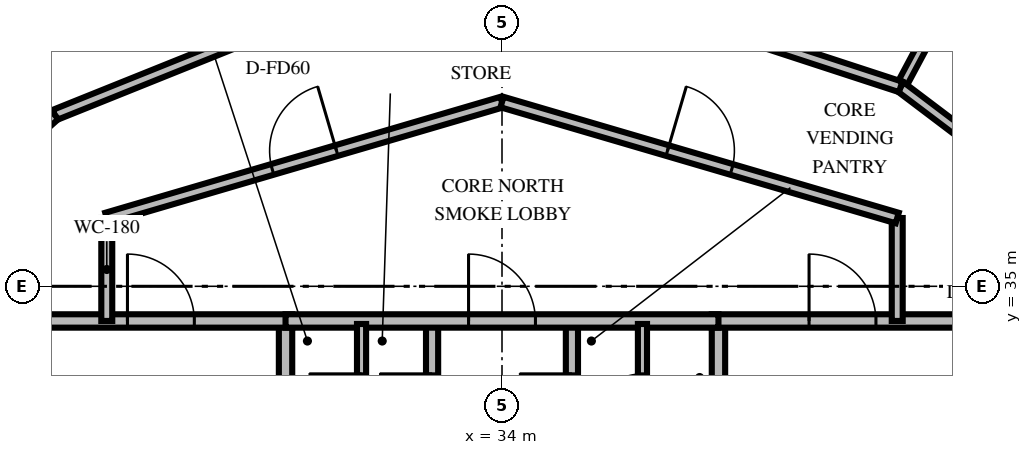
"""IFC4 building model, lengths in metres.
Left out: names, types, materials, properties, quantities, classifications, styles, units other than length and angle.
Written with IfcOpenShell. Run it as: python <this file> out.ifc"""

import sys

from ifc_helpers import new_model, si_unit, direction, frame, frame_2d, origin, place, context, subcontext, project, spatial, rectangle, extrude, element, fill, save


model = new_model("IFC4")
c1 = context("Model", 3, precision=1e-05, world=origin(), true_north=direction((0.0, 1.0)))
c2 = subcontext(c1, "Body", "Model", "MODEL_VIEW")
j1 = project(units=[si_unit("LENGTHUNIT", "METRE"), si_unit("PLANEANGLEUNIT", "RADIAN")], contexts=[c1])
p1 = place(None, origin())
s1 = spatial("IfcSite", under=j1, at=p1, CompositionType="ELEMENT")
p2 = place(p1, origin())
s2 = spatial("IfcBuilding", under=s1, at=p2, CompositionType="ELEMENT")
p3 = place(p2, frame((0.0, 0.0, 38.4)))
s3 = spatial("IfcBuildingStorey", under=s2, at=p3, CompositionType="ELEMENT", Elevation=38.4)
p4 = place(p3, frame((30.44, 30.05, 0.0), z_axis=(0.0, 0.0, 1.0), x_axis=(0.0, 1.0, 0.0)))
e1 = element("IfcWall", 1, at=p4, inside=s3, PredefinedType="SOLIDWALL", context=c2, shape_type="SweptSolid", body=[
    extrude(rectangle(XDim=4.38, YDim=0.22, at=frame_2d((2.19, 0.0))), origin(), (0.0, 0.0, 1.0), 3.0),
])
p5 = place(p4, frame((0.8, 0.0, 0.0)))
e2 = element("IfcOpeningElement", 2, at=p5, cuts=e1, PredefinedType="OPENING", context=c2, shape_type="SweptSolid", body=[
    extrude(rectangle(XDim=1.05, YDim=2.1, at=frame_2d((0.525, 1.05))), frame((0.0, 0.12, 0.0), z_axis=(0.0, -1.0, 0.0), x_axis=(1.0, 0.0, 0.0)), (0.0, 0.0, 1.0), 0.24),
])
p6 = place(p3, frame((26.24, 34.43, 0.0), z_axis=(0.0, 0.0, 1.0), x_axis=(1.0, 0.0, 0.0)))
e3 = element("IfcWall", 3, at=p6, inside=s3, PredefinedType="SOLIDWALL", context=c2, shape_type="SweptSolid", body=[
    extrude(rectangle(XDim=4.31, YDim=0.22, at=frame_2d((2.155, 0.0))), origin(), (0.0, 0.0, 1.0), 3.0),
])
p7 = place(p6, frame((1.6, 0.0, 0.0)))
e4 = element("IfcOpeningElement", 4, at=p7, cuts=e3, PredefinedType="OPENING", context=c2, shape_type="SweptSolid", body=[
    extrude(rectangle(XDim=1.1, YDim=2.15, at=frame_2d((0.55, 1.075))), frame((0.0, 0.12, 0.0), z_axis=(0.0, -1.0, 0.0), x_axis=(1.0, 0.0, 0.0)), (0.0, 0.0, 1.0), 0.24),
])
p8 = place(p3, frame((32.85, 30.05, 0.0), z_axis=(0.0, 0.0, 1.0), x_axis=(0.0, 1.0, 0.0)))
e5 = element("IfcWall", 5, at=p8, inside=s3, PredefinedType="SOLIDWALL", context=c2, shape_type="SweptSolid", body=[
    extrude(rectangle(XDim=4.38, YDim=0.2, at=frame_2d((2.19, 0.0))), origin(), (0.0, 0.0, 1.0), 3.0),
])
p9 = place(p8, frame((2.65, 0.0, 0.0)))
e6 = element("IfcOpeningElement", 6, at=p9, cuts=e5, PredefinedType="OPENING", context=c2, shape_type="SweptSolid", body=[
    extrude(rectangle(XDim=0.86, YDim=2.05, at=frame_2d((0.43, 1.025))), frame((0.0, 0.11, 0.0), z_axis=(0.0, -1.0, 0.0), x_axis=(1.0, 0.0, 0.0)), (0.0, 0.0, 1.0), 0.22),
])
p10 = place(p3, frame((37.56, 30.05, 0.0), z_axis=(0.0, 0.0, 1.0), x_axis=(0.0, 1.0, 0.0)))
e7 = element("IfcWall", 7, at=p10, inside=s3, PredefinedType="SOLIDWALL", context=c2, shape_type="SweptSolid", body=[
    extrude(rectangle(XDim=4.38, YDim=0.22, at=frame_2d((2.19, 0.0))), origin(), (0.0, 0.0, 1.0), 3.0),
])
p11 = place(p10, frame((0.8, 0.0, 0.0)))
e8 = element("IfcOpeningElement", 8, at=p11, cuts=e7, PredefinedType="OPENING", context=c2, shape_type="SweptSolid", body=[
    extrude(rectangle(XDim=1.05, YDim=2.1, at=frame_2d((0.525, 1.05))), frame((0.0, 0.12, 0.0), z_axis=(0.0, -1.0, 0.0), x_axis=(1.0, 0.0, 0.0)), (0.0, 0.0, 1.0), 0.24),
])
p12 = place(p3, frame((37.45, 34.43, 0.0), z_axis=(0.0, 0.0, 1.0), x_axis=(1.0, 0.0, 0.0)))
e9 = element("IfcWall", 9, at=p12, inside=s3, PredefinedType="SOLIDWALL", context=c2, shape_type="SweptSolid", body=[
    extrude(rectangle(XDim=4.31, YDim=0.22, at=frame_2d((2.155, 0.0))), origin(), (0.0, 0.0, 1.0), 3.0),
])
p13 = place(p12, frame((1.6, 0.0, 0.0)))
e10 = element("IfcOpeningElement", 10, at=p13, cuts=e9, PredefinedType="OPENING", context=c2, shape_type="SweptSolid", body=[
    extrude(rectangle(XDim=1.1, YDim=2.15, at=frame_2d((0.55, 1.075))), frame((0.0, 0.12, 0.0), z_axis=(0.0, -1.0, 0.0), x_axis=(1.0, 0.0, 0.0)), (0.0, 0.0, 1.0), 0.24),
])
p14 = place(p3, frame((35.15, 30.05, 0.0), z_axis=(0.0, 0.0, 1.0), x_axis=(0.0, 1.0, 0.0)))
e11 = element("IfcWall", 11, at=p14, inside=s3, PredefinedType="SOLIDWALL", context=c2, shape_type="SweptSolid", body=[
    extrude(rectangle(XDim=4.38, YDim=0.2, at=frame_2d((2.19, 0.0))), origin(), (0.0, 0.0, 1.0), 3.0),
])
p15 = place(p14, frame((2.65, 0.0, 0.0)))
e12 = element("IfcOpeningElement", 12, at=p15, cuts=e11, PredefinedType="OPENING", context=c2, shape_type="SweptSolid", body=[
    extrude(rectangle(XDim=0.86, YDim=2.05, at=frame_2d((0.43, 1.025))), frame((0.0, 0.11, 0.0), z_axis=(0.0, -1.0, 0.0), x_axis=(1.0, 0.0, 0.0)), (0.0, 0.0, 1.0), 0.22),
])
p16 = place(p3, frame((30.44, 34.43, 0.0), z_axis=(0.0, 0.0, 1.0), x_axis=(1.0, 0.0, 0.0)))
e13 = element("IfcWall", 13, at=p16, inside=s3, PredefinedType="SOLIDWALL", context=c2, shape_type="SweptSolid", body=[
    extrude(rectangle(XDim=7.12, YDim=0.22, at=frame_2d((3.56, 0.0))), origin(), (0.0, 0.0, 1.0), 3.0),
])
p17 = place(p16, frame((3.01, 0.0, 0.0)))
e14 = element("IfcOpeningElement", 14, at=p17, cuts=e13, PredefinedType="OPENING", context=c2, shape_type="SweptSolid", body=[
    extrude(rectangle(XDim=1.1, YDim=2.15, at=frame_2d((0.55, 1.075))), frame((0.0, 0.12, 0.0), z_axis=(0.0, -1.0, 0.0), x_axis=(1.0, 0.0, 0.0)), (0.0, 0.0, 1.0), 0.24),
])
p18 = place(p3, frame((31.69, 32.05, 0.0), z_axis=(0.0, 0.0, 1.0), x_axis=(0.0, 1.0, 0.0)))
e15 = element("IfcWall", 15, at=p18, inside=s3, PredefinedType="PARTITIONING", context=c2, shape_type="SweptSolid", body=[
    extrude(rectangle(XDim=2.33, YDim=0.15, at=frame_2d((1.165, 0.0))), origin(), (0.0, 0.0, 1.0), 3.0),
])
p19 = place(p18, frame((0.65, 0.0, 0.0)))
e16 = element("IfcOpeningElement", 16, at=p19, cuts=e15, PredefinedType="OPENING", context=c2, shape_type="SweptSolid", body=[
    extrude(rectangle(XDim=0.86, YDim=2.05, at=frame_2d((0.43, 1.025))), frame((0.0, 0.085, 0.0), z_axis=(0.0, -1.0, 0.0), x_axis=(1.0, 0.0, 0.0)), (0.0, 0.0, 1.0), 0.17),
])
p20 = place(p3, frame((36.31, 32.05, 0.0), z_axis=(0.0, 0.0, 1.0), x_axis=(0.0, 1.0, 0.0)))
e17 = element("IfcWall", 17, at=p20, inside=s3, PredefinedType="PARTITIONING", context=c2, shape_type="SweptSolid", body=[
    extrude(rectangle(XDim=2.33, YDim=0.15, at=frame_2d((1.165, 0.0))), origin(), (0.0, 0.0, 1.0), 3.0),
])
p21 = place(p20, frame((0.65, 0.0, 0.0)))
e18 = element("IfcOpeningElement", 18, at=p21, cuts=e17, PredefinedType="OPENING", context=c2, shape_type="SweptSolid", body=[
    extrude(rectangle(XDim=0.86, YDim=2.05, at=frame_2d((0.43, 1.025))), frame((0.0, 0.085, 0.0), z_axis=(0.0, -1.0, 0.0), x_axis=(1.0, 0.0, 0.0)), (0.0, 0.0, 1.0), 0.17),
])
for number, where, z_axis, x_axis in (
    (19, (27.5, 34.43, 0.0), (0.0, 0.0, 1.0), (0.0, 1.0, 0.0)),
    (20, (40.5, 36.123, 0.0), (0.0, 0.0, 1.0), (0.0, -1.0, 0.0)),
):
    element("IfcWall", number, at=place(p3, frame(where, z_axis=z_axis, x_axis=x_axis)), inside=s3, PredefinedType="PARTITIONING", context=c2, shape_type="SweptSolid", body=[
        extrude(rectangle(XDim=1.693, YDim=0.18, at=frame_2d((0.846, 0.0))), origin(), (0.0, 0.0, 1.0), 3.0),
    ])
p22 = place(p3, frame((27.5, 36.123, 0.0), z_axis=(0.0, 0.0, 1.0), x_axis=(0.959546654541, 0.281549671923, 0.0)))
e21 = element("IfcWall", 21, at=p22, inside=s3, PredefinedType="PARTITIONING", context=c2, shape_type="SweptSolid", body=[
    extrude(rectangle(XDim=6.774, YDim=0.18, at=frame_2d((3.387, 0.0))), origin(), (0.0, 0.0, 1.0), 3.0),
])
p23 = place(p22, frame((2.837, 0.0, 0.0)))
e22 = element("IfcOpeningElement", 22, at=p23, cuts=e21, PredefinedType="OPENING", context=c2, shape_type="SweptSolid", body=[
    extrude(rectangle(XDim=1.1, YDim=2.15, at=frame_2d((0.55, 1.075))), frame((0.0, 0.1, 0.0), z_axis=(0.0, -1.0, 0.0), x_axis=(1.0, 0.0, 0.0)), (0.0, 0.0, 1.0), 0.2),
])
p24 = place(p3, frame((34.0, 38.03, 0.0), z_axis=(0.0, 0.0, 1.0), x_axis=(0.959546654541, -0.281549671923, 0.0)))
e23 = element("IfcWall", 23, at=p24, inside=s3, PredefinedType="PARTITIONING", context=c2, shape_type="SweptSolid", body=[
    extrude(rectangle(XDim=6.774, YDim=0.18, at=frame_2d((3.387, 0.0))), origin(), (0.0, 0.0, 1.0), 3.0),
])
p25 = place(p24, frame((2.837, 0.0, 0.0)))
e24 = element("IfcOpeningElement", 24, at=p25, cuts=e23, PredefinedType="OPENING", context=c2, shape_type="SweptSolid", body=[
    extrude(rectangle(XDim=1.1, YDim=2.15, at=frame_2d((0.55, 1.075))), frame((0.0, 0.1, 0.0), z_axis=(0.0, -1.0, 0.0), x_axis=(1.0, 0.0, 0.0)), (0.0, 0.0, 1.0), 0.2),
])
p26 = place(p3, frame((40.556, 38.279, 0.0), z_axis=(0.0, 0.0, 1.0), x_axis=(0.471021282729, 0.882121846015, 0.0)))
e25 = element("IfcWall", 25, at=p26, inside=s3, PredefinedType="PARTITIONING", context=c2, shape_type="SweptSolid", body=[
    extrude(rectangle(XDim=8.573, YDim=0.16, at=frame_2d((4.286, 0.0))), origin(), (0.0, 0.0, 1.0), 3.0),
])
p27 = place(p3, frame((44.03, 35.652, 0.0), z_axis=(0.0, 0.0, 1.0), x_axis=(-0.797571843353, 0.603223967271, 0.0)))
e26 = element("IfcWall", 26, at=p27, inside=s3, PredefinedType="PARTITIONING", context=c2, shape_type="SweptSolid", body=[
    extrude(rectangle(XDim=4.355, YDim=0.18, at=frame_2d((2.178, 0.0))), origin(), (0.0, 0.0, 1.0), 3.0),
])
p28 = place(p27, frame((0.914, 0.0, 0.0)))
e27 = element("IfcOpeningElement", 27, at=p28, cuts=e26, PredefinedType="OPENING", context=c2, shape_type="SweptSolid", body=[
    extrude(rectangle(XDim=1.0, YDim=2.15, at=frame_2d((0.5, 1.075))), frame((0.0, 0.1, 0.0), z_axis=(0.0, -1.0, 0.0), x_axis=(1.0, 0.0, 0.0)), (0.0, 0.0, 1.0), 0.2),
])
for number, where, z_axis, x_axis in (
    (28, (40.556, 38.279, 0.0), (0.0, 0.0, 1.0), (-0.951, 0.311, 0.0)),
    (29, (31.13, 39.621, 0.0), (0.0, 0.0, 1.0), (-0.928, -0.373, 0.0)),
):
    element("IfcWall", number, at=place(p3, frame(where, z_axis=z_axis, x_axis=x_axis)), inside=s3, PredefinedType="PARTITIONING", context=c2, shape_type="SweptSolid", body=[
        extrude(rectangle(XDim=4.834, YDim=0.18, at=frame_2d((2.417, 0.0))), origin(), (0.0, 0.0, 1.0), 3.0),
    ])
p29 = place(p3, frame((26.644, 37.818, 0.0), z_axis=(0.0, 0.0, 1.0), x_axis=(-0.744302787757, -0.667842316821, 0.0)))
e30 = element("IfcWall", 30, at=p29, inside=s3, PredefinedType="PARTITIONING", context=c2, shape_type="SweptSolid", body=[
    extrude(rectangle(XDim=4.834, YDim=0.18, at=frame_2d((2.417, 0.0))), origin(), (0.0, 0.0, 1.0), 3.0),
])
p30 = place(p29, frame((2.688, 0.0, 0.0)))
e31 = element("IfcOpeningElement", 31, at=p30, cuts=e30, PredefinedType="OPENING", context=c2, shape_type="SweptSolid", body=[
    extrude(rectangle(XDim=1.15, YDim=2.15, at=frame_2d((0.575, 1.075))), frame((0.0, 0.1, 0.0), z_axis=(0.0, -1.0, 0.0), x_axis=(1.0, 0.0, 0.0)), (0.0, 0.0, 1.0), 0.2),
])
p31 = place(p7, origin())
e32 = element("IfcDoor", 32, at=p31, inside=s3, OperationType="SINGLE_SWING_LEFT", PredefinedType="DOOR", context=c2, shape_type="SweptSolid", body=[
    extrude(rectangle(XDim=1.1, YDim=2.15, at=frame_2d((0.55, 1.075))), frame((0.0, 0.025, 0.0), z_axis=(0.0, -1.0, 0.0), x_axis=(1.0, 0.0, 0.0)), (0.0, 0.0, 1.0), 0.05),
])
fill(e4, e32)
p32 = place(p9, origin())
e33 = element("IfcDoor", 33, at=p32, inside=s3, OperationType="SINGLE_SWING_RIGHT", PredefinedType="TRAPDOOR", context=c2, shape_type="SweptSolid", body=[
    extrude(rectangle(XDim=0.86, YDim=2.05, at=frame_2d((0.43, 1.025))), frame((0.0, 0.025, 0.0), z_axis=(0.0, -1.0, 0.0), x_axis=(1.0, 0.0, 0.0)), (0.0, 0.0, 1.0), 0.05),
])
fill(e6, e33)
p33 = place(p13, origin())
e34 = element("IfcDoor", 34, at=p33, inside=s3, OperationType="SINGLE_SWING_LEFT", PredefinedType="DOOR", context=c2, shape_type="SweptSolid", body=[
    extrude(rectangle(XDim=1.1, YDim=2.15, at=frame_2d((0.55, 1.075))), frame((0.0, 0.025, 0.0), z_axis=(0.0, -1.0, 0.0), x_axis=(1.0, 0.0, 0.0)), (0.0, 0.0, 1.0), 0.05),
])
fill(e10, e34)
p34 = place(p15, origin())
e35 = element("IfcDoor", 35, at=p34, inside=s3, OperationType="SINGLE_SWING_RIGHT", PredefinedType="TRAPDOOR", context=c2, shape_type="SweptSolid", body=[
    extrude(rectangle(XDim=0.86, YDim=2.05, at=frame_2d((0.43, 1.025))), frame((0.0, 0.025, 0.0), z_axis=(0.0, -1.0, 0.0), x_axis=(1.0, 0.0, 0.0)), (0.0, 0.0, 1.0), 0.05),
])
fill(e12, e35)
p35 = place(p17, origin())
e36 = element("IfcDoor", 36, at=p35, inside=s3, OperationType="SINGLE_SWING_LEFT", PredefinedType="DOOR", context=c2, shape_type="SweptSolid", body=[
    extrude(rectangle(XDim=1.1, YDim=2.15, at=frame_2d((0.55, 1.075))), frame((0.0, 0.025, 0.0), z_axis=(0.0, -1.0, 0.0), x_axis=(1.0, 0.0, 0.0)), (0.0, 0.0, 1.0), 0.05),
])
fill(e14, e36)
p36 = place(p19, origin())
e37 = element("IfcDoor", 37, at=p36, inside=s3, OperationType="SINGLE_SWING_RIGHT", PredefinedType="TRAPDOOR", context=c2, shape_type="SweptSolid", body=[
    extrude(rectangle(XDim=0.86, YDim=2.05, at=frame_2d((0.43, 1.025))), frame((0.0, 0.025, 0.0), z_axis=(0.0, -1.0, 0.0), x_axis=(1.0, 0.0, 0.0)), (0.0, 0.0, 1.0), 0.05),
])
fill(e16, e37)
p37 = place(p21, origin())
e38 = element("IfcDoor", 38, at=p37, inside=s3, OperationType="SINGLE_SWING_LEFT", PredefinedType="TRAPDOOR", context=c2, shape_type="SweptSolid", body=[
    extrude(rectangle(XDim=0.86, YDim=2.05, at=frame_2d((0.43, 1.025))), frame((0.0, 0.025, 0.0), z_axis=(0.0, -1.0, 0.0), x_axis=(1.0, 0.0, 0.0)), (0.0, 0.0, 1.0), 0.05),
])
fill(e18, e38)
p38 = place(p23, origin())
e39 = element("IfcDoor", 39, at=p38, inside=s3, OperationType="SINGLE_SWING_RIGHT", PredefinedType="DOOR", context=c2, shape_type="SweptSolid", body=[
    extrude(rectangle(XDim=1.1, YDim=2.15, at=frame_2d((0.55, 1.075))), frame((0.0, 0.025, 0.0), z_axis=(0.0, -1.0, 0.0), x_axis=(1.0, 0.0, 0.0)), (0.0, 0.0, 1.0), 0.05),
])
fill(e22, e39)
p39 = place(p25, origin())
e40 = element("IfcDoor", 40, at=p39, inside=s3, OperationType="SINGLE_SWING_LEFT", PredefinedType="DOOR", context=c2, shape_type="SweptSolid", body=[
    extrude(rectangle(XDim=1.1, YDim=2.15, at=frame_2d((0.55, 1.075))), frame((0.0, 0.025, 0.0), z_axis=(0.0, -1.0, 0.0), x_axis=(1.0, 0.0, 0.0)), (0.0, 0.0, 1.0), 0.05),
])
fill(e24, e40)
save(model, sys.argv[1])
